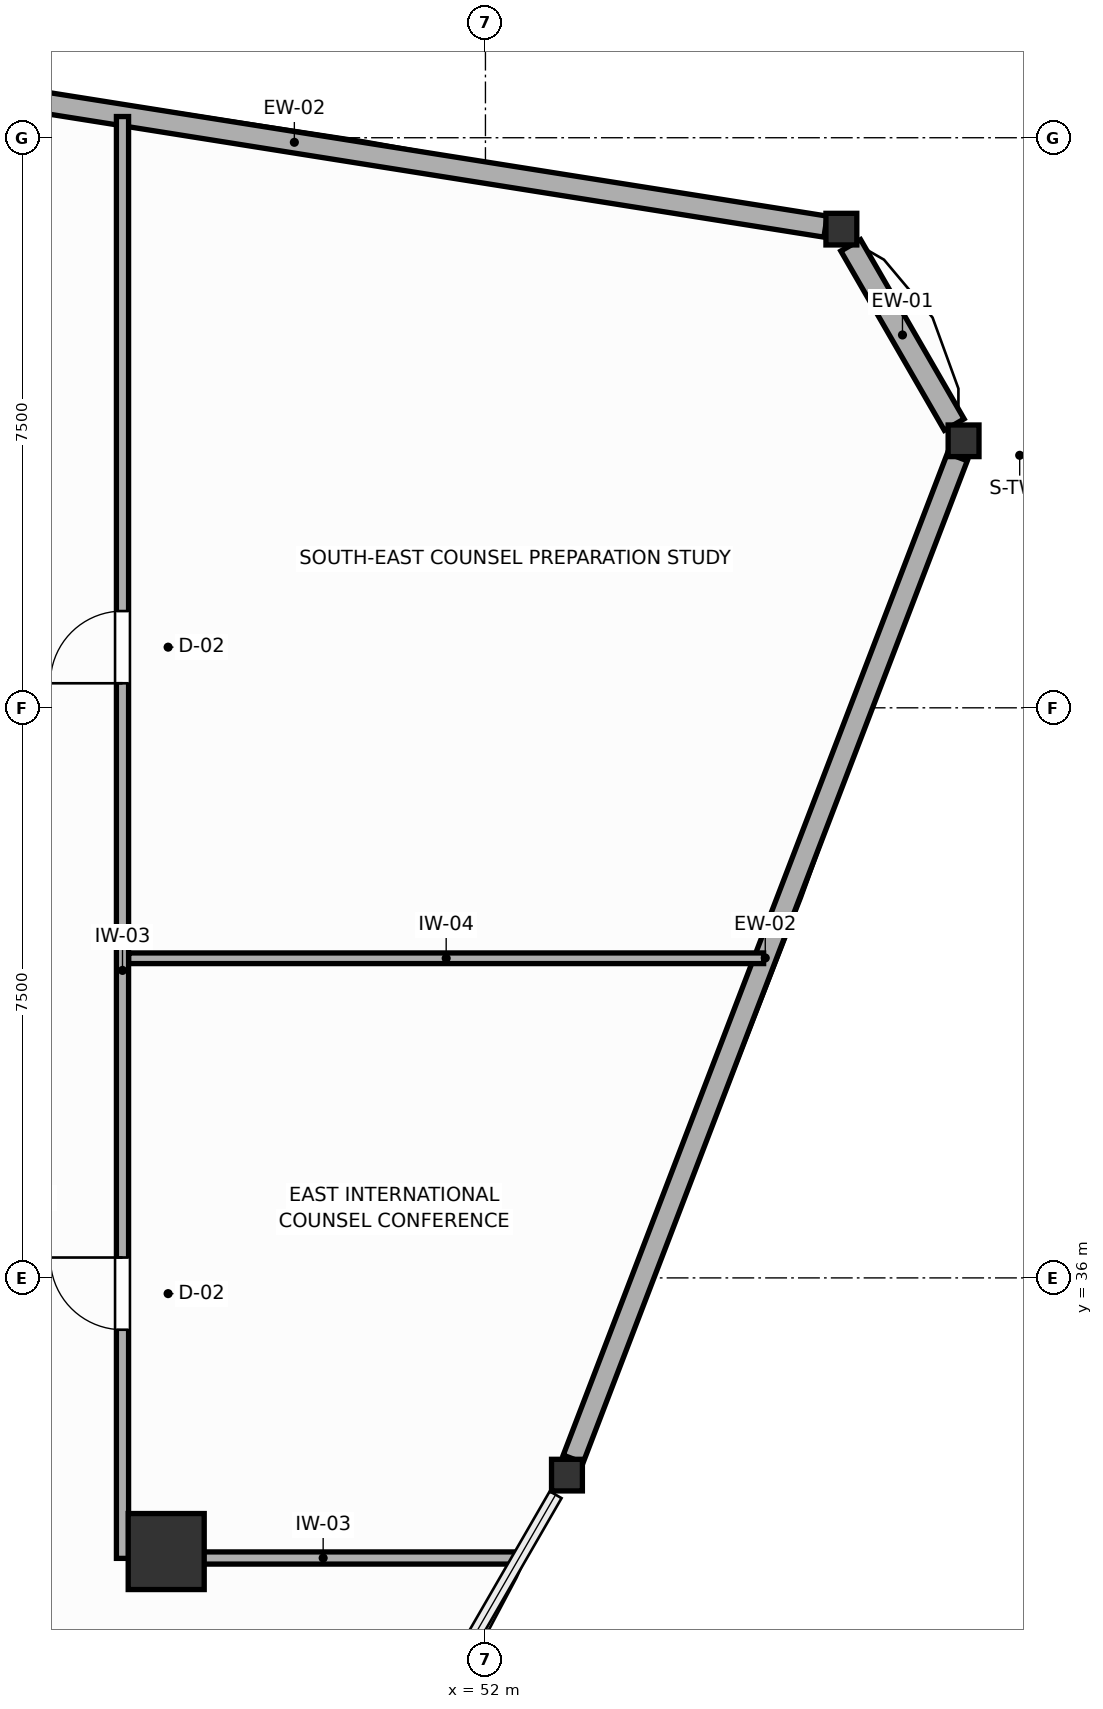
"""IFC4 building model, lengths in metres.
Left out: names, types, materials, properties, quantities, classifications, styles, units other than length and angle.
Written with IfcOpenShell. Run it as: python <this file> out.ifc"""

import sys

from ifc_helpers import new_model, si_unit, direction, frame, frame_2d, origin, origin_2d, place, context, subcontext, project, spatial, rectangle, i_section, extrude, source, transform, mapped, element, fill, save


model = new_model("IFC4")
c1 = context("Model", 3, precision=1e-05, world=origin(), true_north=direction((0.0, 1.0)))
c2 = subcontext(c1, "Body", "Model", "MODEL_VIEW")
j1 = project(units=[si_unit("LENGTHUNIT", "METRE"), si_unit("PLANEANGLEUNIT", "RADIAN")], contexts=[c1])
p1 = place(None, origin())
s1 = spatial("IfcSite", under=j1, at=p1, CompositionType="ELEMENT")
p2 = place(p1, origin())
s2 = spatial("IfcBuilding", under=s1, at=p2, CompositionType="ELEMENT")
p3 = place(p2, frame((0.0, 0.0, 186.6)))
s3 = spatial("IfcBuildingStorey", under=s2, at=p3, CompositionType="ELEMENT", Elevation=186.6)
m1 = source(origin(), c2, "Body", "SweptSolid", [
    extrude(rectangle(XDim=1.0, YDim=1.0, at=origin_2d()), origin(), (0.0, 0.0, 1.0), 3.6),
])
p4 = place(p3, frame((47.8, 32.4, 0.0), z_axis=(0.0, 0.0, 1.0), x_axis=(1.0, 0.0, 0.0)))
e1 = element("IfcColumn", 1, at=p4, inside=s3, PredefinedType="COLUMN", context=c2, shape_type="MappedRepresentation", body=[
    mapped(m1, transform((0.0, 0.0, 0.0), scale=1.0)),
])
m2 = source(origin(), c2, "Body", "SweptSolid", [
    extrude(i_section(OverallWidth=0.406, OverallDepth=0.416, WebThickness=0.027, FlangeThickness=0.044, FilletRadius=0.015, at=origin_2d()), origin(), (0.0, 0.0, 1.0), 3.6),
])
for number, where, z_axis, x_axis in (
    (2, (58.29, 47.013, 0.0), (0.0, 0.0, 1.0), (1.0, 0.0, 0.0)),
    (3, (56.683, 49.798, 0.0), (0.0, 0.0, 1.0), (1.0, 0.0, 0.0)),
    (4, (53.073, 33.406, 0.0), (0.0, 0.0, 1.0), (1.0, 0.0, 0.0)),
):
    element("IfcColumn", number, at=place(p3, frame(where, z_axis=z_axis, x_axis=x_axis)), inside=s3, PredefinedType="COLUMN", context=c2, shape_type="MappedRepresentation", body=[
        mapped(m2, transform((0.0, 0.0, 0.0), scale=1.0)),
    ])
p5 = place(p3, frame((58.167, 47.226, 0.0), z_axis=(0.0, 0.0, 1.0), x_axis=(-0.499947493121, 0.866055716523, 0.0)))
e5 = element("IfcWall", 5, at=p5, inside=s3, PredefinedType="SOLIDWALL", context=c2, shape_type="SweptSolid", body=[
    extrude(rectangle(XDim=2.723, YDim=0.3, at=frame_2d((1.362, 0.0))), origin(), (0.0, 0.0, 1.0), 1.87),
])
p6 = place(p3, frame((56.475, 49.831, 0.0), z_axis=(0.0, 0.0, 1.0), x_axis=(-0.987634086957, 0.156776625426, 0.0)))
e6 = element("IfcWall", 6, at=p6, inside=s3, PredefinedType="SOLIDWALL", context=c2, shape_type="SweptSolid", body=[
    extrude(rectangle(XDim=14.152, YDim=0.28, at=frame_2d((7.076, 0.0))), origin(), (0.0, 0.0, 1.0), 1.87),
])
p7 = place(p3, frame((53.154, 33.618, 0.0), z_axis=(0.0, 0.0, 1.0), x_axis=(0.358033263681, 0.933708831541, 0.0)))
e7 = element("IfcWall", 7, at=p7, inside=s3, PredefinedType="SOLIDWALL", context=c2, shape_type="SweptSolid", body=[
    extrude(rectangle(XDim=14.117, YDim=0.28, at=frame_2d((7.059, 0.0))), origin(), (0.0, 0.0, 1.0), 1.87),
])
p8 = place(p3, frame((47.225, 32.31, 0.0), z_axis=(0.0, 0.0, 1.0), x_axis=(0.0, 1.0, 0.0)))
e8 = element("IfcWall", 8, at=p8, inside=s3, PredefinedType="PARTITIONING", context=c2, shape_type="SweptSolid", body=[
    extrude(rectangle(XDim=18.969, YDim=0.16, at=frame_2d((9.484, 0.0))), origin(), (0.0, 0.0, 1.0), 3.4),
])
p9 = place(p8, frame((3.008, 0.0, 0.0)))
e9 = element("IfcOpeningElement", 9, at=p9, cuts=e8, PredefinedType="OPENING", context=c2, shape_type="SweptSolid", body=[
    extrude(rectangle(XDim=0.95, YDim=2.05, at=frame_2d((0.475, 1.025))), frame((0.0, 0.09, 0.0), z_axis=(0.0, -1.0, 0.0), x_axis=(1.0, 0.0, 0.0)), (0.0, 0.0, 1.0), 0.18),
])
p10 = place(p8, frame((11.513, 0.0, 0.0)))
e10 = element("IfcOpeningElement", 10, at=p10, cuts=e8, PredefinedType="OPENING", context=c2, shape_type="SweptSolid", body=[
    extrude(rectangle(XDim=0.95, YDim=2.05, at=frame_2d((0.475, 1.025))), frame((0.0, 0.09, 0.0), z_axis=(0.0, -1.0, 0.0), x_axis=(1.0, 0.0, 0.0)), (0.0, 0.0, 1.0), 0.18),
])
p11 = place(p3, frame((47.307, 32.315, 0.0), z_axis=(0.0, 0.0, 1.0), x_axis=(1.0, 0.0, 0.0)))
e11 = element("IfcWall", 11, at=p11, inside=s3, PredefinedType="PARTITIONING", context=c2, shape_type="SweptSolid", body=[
    extrude(rectangle(XDim=5.116, YDim=0.16, at=frame_2d((2.558, 0.0))), origin(), (0.0, 0.0, 1.0), 2.16),
])
p12 = place(p3, frame((47.307, 40.205, 0.0), z_axis=(0.0, 0.0, 1.0), x_axis=(1.0, 0.0, 0.0)))
e12 = element("IfcWall", 12, at=p12, inside=s3, PredefinedType="PARTITIONING", context=c2, shape_type="SweptSolid", body=[
    extrude(rectangle(XDim=8.353, YDim=0.14, at=frame_2d((4.176, 0.0))), origin(), (0.0, 0.0, 1.0), 3.4),
])
p13 = place(p9, origin())
e13 = element("IfcDoor", 13, at=p13, inside=s3, OperationType="SINGLE_SWING_RIGHT", PredefinedType="DOOR", context=c2, shape_type="SweptSolid", body=[
    extrude(rectangle(XDim=0.95, YDim=2.05, at=frame_2d((0.475, 1.025))), frame((0.0, 0.025, 0.0), z_axis=(0.0, -1.0, 0.0), x_axis=(1.0, 0.0, 0.0)), (0.0, 0.0, 1.0), 0.05),
])
fill(e9, e13)
p14 = place(p10, origin())
e14 = element("IfcDoor", 14, at=p14, inside=s3, OperationType="SINGLE_SWING_LEFT", PredefinedType="DOOR", context=c2, shape_type="SweptSolid", body=[
    extrude(rectangle(XDim=0.95, YDim=2.05, at=frame_2d((0.475, 1.025))), frame((0.0, 0.025, 0.0), z_axis=(0.0, -1.0, 0.0), x_axis=(1.0, 0.0, 0.0)), (0.0, 0.0, 1.0), 0.05),
])
fill(e10, e14)
save(model, sys.argv[1])
